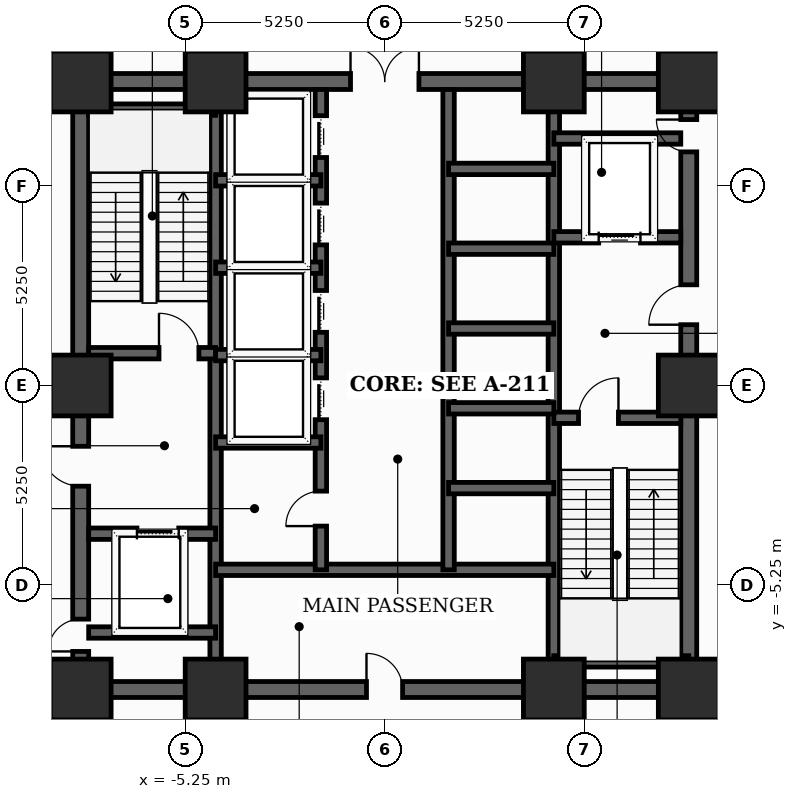
"""IFC4 building model, lengths in metres.
Left out: names, types, materials, properties, quantities, classifications, styles, units other than length and angle.
Written with IfcOpenShell. Run it as: python <this file> out.ifc"""

import sys

from ifc_helpers import new_model, si_unit, direction, frame, frame_2d, origin, origin_2d, place, context, subcontext, project, spatial, rectangle, extrude, element, fill, save


model = new_model("IFC4")
c1 = context("Model", 3, precision=1e-05, world=origin(), true_north=direction((0.0, 1.0)))
c2 = subcontext(c1, "Body", "Model", "MODEL_VIEW")
j1 = project(units=[si_unit("LENGTHUNIT", "METRE"), si_unit("PLANEANGLEUNIT", "RADIAN")], contexts=[c1])
p1 = place(None, origin())
s1 = spatial("IfcSite", under=j1, at=p1, CompositionType="ELEMENT")
p2 = place(p1, origin())
s2 = spatial("IfcBuilding", under=s1, at=p2, CompositionType="ELEMENT")
p3 = place(p2, frame((0.0, 0.0, -9.6)))
s3 = spatial("IfcBuildingStorey", under=s2, at=p3, CompositionType="ELEMENT", Elevation=-9.6)
for number, where, z_axis, x_axis in (
    (1, (-8.0, -8.0, 0.0), (0.0, 0.0, 1.0), (1.0, 0.0, 0.0)),
    (2, (-4.45, -8.0, 0.0), (0.0, 0.0, 1.0), (1.0, 0.0, 0.0)),
    (3, (4.45, -8.0, 0.0), (0.0, 0.0, 1.0), (1.0, 0.0, 0.0)),
    (4, (8.0, -8.0, 0.0), (0.0, 0.0, 1.0), (1.0, 0.0, 0.0)),
    (5, (8.0, 0.0, 0.0), (0.0, 0.0, 1.0), (1.0, 0.0, 0.0)),
    (6, (8.0, 8.0, 0.0), (0.0, 0.0, 1.0), (1.0, 0.0, 0.0)),
    (7, (4.45, 8.0, 0.0), (0.0, 0.0, 1.0), (1.0, 0.0, 0.0)),
    (8, (-4.45, 8.0, 0.0), (0.0, 0.0, 1.0), (1.0, 0.0, 0.0)),
    (9, (-8.0, 8.0, 0.0), (0.0, 0.0, 1.0), (1.0, 0.0, 0.0)),
    (10, (-8.0, 0.0, 0.0), (0.0, 0.0, 1.0), (1.0, 0.0, 0.0)),
):
    element("IfcColumn", number, at=place(p3, frame(where, z_axis=z_axis, x_axis=x_axis)), inside=s3, PredefinedType="COLUMN", context=c2, shape_type="SweptSolid", body=[
        extrude(rectangle(XDim=1.6, YDim=1.6, at=origin_2d()), origin(), (0.0, 0.0, 1.0), 4.8),
    ])
p4 = place(p3, frame((-8.0, -8.0, 0.0), z_axis=(0.0, 0.0, 1.0), x_axis=(0.0, 1.0, 0.0)))
e11 = element("IfcWall", 11, at=p4, inside=s3, PredefinedType="SHEAR", context=c2, shape_type="SweptSolid", body=[
    extrude(rectangle(XDim=16.0, YDim=0.42, at=frame_2d((8.0, 0.0))), origin(), (0.0, 0.0, 1.0), 4.52),
])
p5 = place(p4, frame((1.002, 0.0, 0.0)))
e12 = element("IfcOpeningElement", 12, at=p5, cuts=e11, PredefinedType="OPENING", context=c2, shape_type="SweptSolid", body=[
    extrude(rectangle(XDim=0.85, YDim=2.02, at=frame_2d((0.425, 1.01))), frame((0.0, 0.22, 0.0), z_axis=(0.0, -1.0, 0.0), x_axis=(1.0, 0.0, 0.0)), (0.0, 0.0, 1.0), 0.44),
])
p6 = place(p4, frame((5.35, 0.0, 0.0)))
e13 = element("IfcOpeningElement", 13, at=p6, cuts=e11, PredefinedType="OPENING", context=c2, shape_type="SweptSolid", body=[
    extrude(rectangle(XDim=1.05, YDim=2.15, at=frame_2d((0.525, 1.075))), frame((0.0, 0.22, 0.0), z_axis=(0.0, -1.0, 0.0), x_axis=(1.0, 0.0, 0.0)), (0.0, 0.0, 1.0), 0.44),
])
p7 = place(p3, frame((8.0, -8.0, 0.0), z_axis=(0.0, 0.0, 1.0), x_axis=(0.0, 1.0, 0.0)))
e14 = element("IfcWall", 14, at=p7, inside=s3, PredefinedType="SHEAR", context=c2, shape_type="SweptSolid", body=[
    extrude(rectangle(XDim=16.0, YDim=0.42, at=frame_2d((8.0, 0.0))), origin(), (0.0, 0.0, 1.0), 4.52),
])
p8 = place(p7, frame((9.6, 0.0, 0.0)))
e15 = element("IfcOpeningElement", 15, at=p8, cuts=e14, PredefinedType="OPENING", context=c2, shape_type="SweptSolid", body=[
    extrude(rectangle(XDim=1.05, YDim=2.15, at=frame_2d((0.525, 1.075))), frame((0.0, 0.22, 0.0), z_axis=(0.0, -1.0, 0.0), x_axis=(1.0, 0.0, 0.0)), (0.0, 0.0, 1.0), 0.44),
])
p9 = place(p7, frame((14.148, 0.0, 0.0)))
e16 = element("IfcOpeningElement", 16, at=p9, cuts=e14, PredefinedType="OPENING", context=c2, shape_type="SweptSolid", body=[
    extrude(rectangle(XDim=0.85, YDim=2.02, at=frame_2d((0.425, 1.01))), frame((0.0, 0.22, 0.0), z_axis=(0.0, -1.0, 0.0), x_axis=(1.0, 0.0, 0.0)), (0.0, 0.0, 1.0), 0.44),
])
p10 = place(p3, frame((-8.0, -8.0, 0.0), z_axis=(0.0, 0.0, 1.0), x_axis=(1.0, 0.0, 0.0)))
e17 = element("IfcWall", 17, at=p10, inside=s3, PredefinedType="SHEAR", context=c2, shape_type="SweptSolid", body=[
    extrude(rectangle(XDim=16.0, YDim=0.42, at=frame_2d((8.0, 0.0))), origin(), (0.0, 0.0, 1.0), 4.52),
])
p11 = place(p10, frame((7.52, 0.0, 0.0)))
e18 = element("IfcOpeningElement", 18, at=p11, cuts=e17, PredefinedType="OPENING", context=c2, shape_type="SweptSolid", body=[
    extrude(rectangle(XDim=0.95, YDim=2.1, at=frame_2d((0.475, 1.05))), frame((0.0, 0.22, 0.0), z_axis=(0.0, -1.0, 0.0), x_axis=(1.0, 0.0, 0.0)), (0.0, 0.0, 1.0), 0.44),
])
p12 = place(p3, frame((-8.0, 8.0, 0.0), z_axis=(0.0, 0.0, 1.0), x_axis=(1.0, 0.0, 0.0)))
e19 = element("IfcWall", 19, at=p12, inside=s3, PredefinedType="SHEAR", context=c2, shape_type="SweptSolid", body=[
    extrude(rectangle(XDim=16.0, YDim=0.42, at=frame_2d((8.0, 0.0))), origin(), (0.0, 0.0, 1.0), 4.52),
])
p13 = place(p12, frame((7.1, 0.0, 0.0)))
e20 = element("IfcOpeningElement", 20, at=p13, cuts=e19, PredefinedType="OPENING", context=c2, shape_type="SweptSolid", body=[
    extrude(rectangle(XDim=1.8, YDim=2.15, at=frame_2d((0.9, 1.075))), frame((0.0, 0.22, 0.0), z_axis=(0.0, -1.0, 0.0), x_axis=(1.0, 0.0, 0.0)), (0.0, 0.0, 1.0), 0.44),
])
for number, where, z_axis, x_axis in (
    (21, (-4.45, -7.79, 0.0), (0.0, 0.0, 1.0), (0.0, 1.0, 0.0)),
    (22, (4.45, -7.79, 0.0), (0.0, 0.0, 1.0), (0.0, 1.0, 0.0)),
):
    element("IfcWall", number, at=place(p3, frame(where, z_axis=z_axis, x_axis=x_axis)), inside=s3, PredefinedType="SHEAR", context=c2, shape_type="SweptSolid", body=[
        extrude(rectangle(XDim=15.58, YDim=0.3, at=frame_2d((7.79, 0.0))), origin(), (0.0, 0.0, 1.0), 4.52),
    ])
p14 = place(p3, frame((-7.79, 0.85, 0.0), z_axis=(0.0, 0.0, 1.0), x_axis=(1.0, 0.0, 0.0)))
e23 = element("IfcWall", 23, at=p14, inside=s3, PredefinedType="SHEAR", context=c2, shape_type="SweptSolid", body=[
    extrude(rectangle(XDim=3.34, YDim=0.3, at=frame_2d((1.67, 0.0))), origin(), (0.0, 0.0, 1.0), 4.52),
])
p15 = place(p14, frame((1.85, 0.0, 0.0)))
e24 = element("IfcOpeningElement", 24, at=p15, cuts=e23, PredefinedType="OPENING", context=c2, shape_type="SweptSolid", body=[
    extrude(rectangle(XDim=1.05, YDim=2.15, at=frame_2d((0.525, 1.075))), frame((0.0, 0.16, 0.0), z_axis=(0.0, -1.0, 0.0), x_axis=(1.0, 0.0, 0.0)), (0.0, 0.0, 1.0), 0.32),
])
p16 = place(p3, frame((-7.79, 7.26, 0.0), z_axis=(0.0, 0.0, 1.0), x_axis=(1.0, 0.0, 0.0)))
e25 = element("IfcWall", 25, at=p16, inside=s3, PredefinedType="SHEAR", context=c2, shape_type="SweptSolid", body=[
    extrude(rectangle(XDim=3.34, YDim=0.3, at=frame_2d((1.67, 0.0))), origin(), (0.0, 0.0, 1.0), 4.52),
])
p17 = place(p3, frame((4.45, -0.85, 0.0), z_axis=(0.0, 0.0, 1.0), x_axis=(1.0, 0.0, 0.0)))
e26 = element("IfcWall", 26, at=p17, inside=s3, PredefinedType="SHEAR", context=c2, shape_type="SweptSolid", body=[
    extrude(rectangle(XDim=3.34, YDim=0.3, at=frame_2d((1.67, 0.0))), origin(), (0.0, 0.0, 1.0), 4.52),
])
p18 = place(p17, frame((0.65, 0.0, 0.0)))
e27 = element("IfcOpeningElement", 27, at=p18, cuts=e26, PredefinedType="OPENING", context=c2, shape_type="SweptSolid", body=[
    extrude(rectangle(XDim=1.05, YDim=2.15, at=frame_2d((0.525, 1.075))), frame((0.0, 0.16, 0.0), z_axis=(0.0, -1.0, 0.0), x_axis=(1.0, 0.0, 0.0)), (0.0, 0.0, 1.0), 0.32),
])
p19 = place(p3, frame((4.45, -7.26, 0.0), z_axis=(0.0, 0.0, 1.0), x_axis=(1.0, 0.0, 0.0)))
e28 = element("IfcWall", 28, at=p19, inside=s3, PredefinedType="SHEAR", context=c2, shape_type="SweptSolid", body=[
    extrude(rectangle(XDim=3.55, YDim=0.3, at=frame_2d((1.775, 0.0))), origin(), (0.0, 0.0, 1.0), 4.52),
])
p20 = place(p3, frame((-7.79, -3.9, 0.0), z_axis=(0.0, 0.0, 1.0), x_axis=(1.0, 0.0, 0.0)))
e29 = element("IfcWall", 29, at=p20, inside=s3, PredefinedType="SHEAR", context=c2, shape_type="SweptSolid", body=[
    extrude(rectangle(XDim=3.34, YDim=0.3, at=frame_2d((1.67, 0.0))), origin(), (0.0, 0.0, 1.0), 4.52),
])
p21 = place(p20, frame((1.27, 0.0, 0.0)))
e30 = element("IfcOpeningElement", 30, at=p21, cuts=e29, PredefinedType="OPENING", context=c2, shape_type="SweptSolid", body=[
    extrude(rectangle(XDim=1.1, YDim=2.1, at=frame_2d((0.55, 1.05))), frame((0.0, 0.16, 0.0), z_axis=(0.0, -1.0, 0.0), x_axis=(1.0, 0.0, 0.0)), (0.0, 0.0, 1.0), 0.32),
])
p22 = place(p3, frame((-7.79, -6.5, 0.0), z_axis=(0.0, 0.0, 1.0), x_axis=(1.0, 0.0, 0.0)))
e31 = element("IfcWall", 31, at=p22, inside=s3, PredefinedType="SHEAR", context=c2, shape_type="SweptSolid", body=[
    extrude(rectangle(XDim=3.34, YDim=0.3, at=frame_2d((1.67, 0.0))), origin(), (0.0, 0.0, 1.0), 4.52),
])
p23 = place(p3, frame((4.45, 3.9, 0.0), z_axis=(0.0, 0.0, 1.0), x_axis=(1.0, 0.0, 0.0)))
e32 = element("IfcWall", 32, at=p23, inside=s3, PredefinedType="SHEAR", context=c2, shape_type="SweptSolid", body=[
    extrude(rectangle(XDim=3.34, YDim=0.3, at=frame_2d((1.67, 0.0))), origin(), (0.0, 0.0, 1.0), 4.52),
])
p24 = place(p23, frame((1.18, 0.0, 0.0)))
e33 = element("IfcOpeningElement", 33, at=p24, cuts=e32, PredefinedType="OPENING", context=c2, shape_type="SweptSolid", body=[
    extrude(rectangle(XDim=1.1, YDim=2.1, at=frame_2d((0.55, 1.05))), frame((0.0, 0.16, 0.0), z_axis=(0.0, -1.0, 0.0), x_axis=(1.0, 0.0, 0.0)), (0.0, 0.0, 1.0), 0.32),
])
p25 = place(p3, frame((4.45, 6.5, 0.0), z_axis=(0.0, 0.0, 1.0), x_axis=(1.0, 0.0, 0.0)))
e34 = element("IfcWall", 34, at=p25, inside=s3, PredefinedType="SHEAR", context=c2, shape_type="SweptSolid", body=[
    extrude(rectangle(XDim=3.34, YDim=0.3, at=frame_2d((1.67, 0.0))), origin(), (0.0, 0.0, 1.0), 4.52),
])
p26 = place(p3, frame((-4.45, -4.85, 0.0), z_axis=(0.0, 0.0, 1.0), x_axis=(1.0, 0.0, 0.0)))
e35 = element("IfcWall", 35, at=p26, inside=s3, PredefinedType="SHEAR", context=c2, shape_type="SweptSolid", body=[
    extrude(rectangle(XDim=8.9, YDim=0.3, at=frame_2d((4.45, 0.0))), origin(), (0.0, 0.0, 1.0), 4.52),
])
p27 = place(p3, frame((-1.68, -4.85, 0.0), z_axis=(0.0, 0.0, 1.0), x_axis=(0.0, 1.0, 0.0)))
e36 = element("IfcWall", 36, at=p27, inside=s3, PredefinedType="SHEAR", context=c2, shape_type="SweptSolid", body=[
    extrude(rectangle(XDim=12.64, YDim=0.3, at=frame_2d((6.32, 0.0))), origin(), (0.0, 0.0, 1.0), 4.52),
])
p28 = place(p27, frame((3.95, 0.0, 0.0)))
e37 = element("IfcOpeningElement", 37, at=p28, cuts=e36, PredefinedType="OPENING", context=c2, shape_type="SweptSolid", body=[
    extrude(rectangle(XDim=1.1, YDim=2.1, at=frame_2d((0.55, 1.05))), frame((0.0, 0.16, 0.0), z_axis=(0.0, -1.0, 0.0), x_axis=(1.0, 0.0, 0.0)), (0.0, 0.0, 1.0), 0.32),
])
p29 = place(p27, frame((6.25, 0.0, 0.0)))
e38 = element("IfcOpeningElement", 38, at=p29, cuts=e36, PredefinedType="OPENING", context=c2, shape_type="SweptSolid", body=[
    extrude(rectangle(XDim=1.1, YDim=2.1, at=frame_2d((0.55, 1.05))), frame((0.0, 0.16, 0.0), z_axis=(0.0, -1.0, 0.0), x_axis=(1.0, 0.0, 0.0)), (0.0, 0.0, 1.0), 0.32),
])
p30 = place(p27, frame((8.55, 0.0, 0.0)))
e39 = element("IfcOpeningElement", 39, at=p30, cuts=e36, PredefinedType="OPENING", context=c2, shape_type="SweptSolid", body=[
    extrude(rectangle(XDim=1.1, YDim=2.1, at=frame_2d((0.55, 1.05))), frame((0.0, 0.16, 0.0), z_axis=(0.0, -1.0, 0.0), x_axis=(1.0, 0.0, 0.0)), (0.0, 0.0, 1.0), 0.32),
])
p31 = place(p27, frame((10.85, 0.0, 0.0)))
e40 = element("IfcOpeningElement", 40, at=p31, cuts=e36, PredefinedType="OPENING", context=c2, shape_type="SweptSolid", body=[
    extrude(rectangle(XDim=1.1, YDim=2.1, at=frame_2d((0.55, 1.05))), frame((0.0, 0.16, 0.0), z_axis=(0.0, -1.0, 0.0), x_axis=(1.0, 0.0, 0.0)), (0.0, 0.0, 1.0), 0.32),
])
p32 = place(p27, frame((1.15, 0.0, 0.0)))
e41 = element("IfcOpeningElement", 41, at=p32, cuts=e36, PredefinedType="OPENING", context=c2, shape_type="SweptSolid", body=[
    extrude(rectangle(XDim=0.92, YDim=2.1, at=frame_2d((0.46, 1.05))), frame((0.0, 0.16, 0.0), z_axis=(0.0, -1.0, 0.0), x_axis=(1.0, 0.0, 0.0)), (0.0, 0.0, 1.0), 0.32),
])
p33 = place(p3, frame((1.68, -4.85, 0.0), z_axis=(0.0, 0.0, 1.0), x_axis=(0.0, 1.0, 0.0)))
e42 = element("IfcWall", 42, at=p33, inside=s3, PredefinedType="SHEAR", context=c2, shape_type="SweptSolid", body=[
    extrude(rectangle(XDim=12.64, YDim=0.3, at=frame_2d((6.32, 0.0))), origin(), (0.0, 0.0, 1.0), 4.52),
])
for number, where, z_axis, x_axis in (
    (43, (-4.45, -1.5, 0.0), (0.0, 0.0, 1.0), (1.0, 0.0, 0.0)),
    (44, (-4.45, 0.8, 0.0), (0.0, 0.0, 1.0), (1.0, 0.0, 0.0)),
    (45, (-4.45, 3.1, 0.0), (0.0, 0.0, 1.0), (1.0, 0.0, 0.0)),
    (46, (-4.45, 5.4, 0.0), (0.0, 0.0, 1.0), (1.0, 0.0, 0.0)),
    (47, (1.68, 1.5, 0.0), (0.0, 0.0, 1.0), (1.0, 0.0, 0.0)),
    (48, (1.68, 3.6, 0.0), (0.0, 0.0, 1.0), (1.0, 0.0, 0.0)),
    (49, (1.68, 5.7, 0.0), (0.0, 0.0, 1.0), (1.0, 0.0, 0.0)),
    (50, (1.68, -2.7, 0.0), (0.0, 0.0, 1.0), (1.0, 0.0, 0.0)),
    (51, (1.68, -0.6, 0.0), (0.0, 0.0, 1.0), (1.0, 0.0, 0.0)),
):
    element("IfcWall", number, at=place(p3, frame(where, z_axis=z_axis, x_axis=x_axis)), inside=s3, PredefinedType="SHEAR", context=c2, shape_type="SweptSolid", body=[
        extrude(rectangle(XDim=2.77, YDim=0.3, at=frame_2d((1.385, 0.0))), origin(), (0.0, 0.0, 1.0), 4.52),
    ])
p34 = place(p5, origin())
e52 = element("IfcDoor", 52, at=p34, inside=s3, OperationType="SINGLE_SWING_LEFT", PredefinedType="TRAPDOOR", context=c2, shape_type="SweptSolid", body=[
    extrude(rectangle(XDim=0.85, YDim=2.02, at=frame_2d((0.425, 1.01))), frame((0.0, 0.025, 0.0), z_axis=(0.0, -1.0, 0.0), x_axis=(1.0, 0.0, 0.0)), (0.0, 0.0, 1.0), 0.05),
])
fill(e12, e52)
p35 = place(p6, origin())
e53 = element("IfcDoor", 53, at=p35, inside=s3, OperationType="SINGLE_SWING_RIGHT", PredefinedType="DOOR", context=c2, shape_type="SweptSolid", body=[
    extrude(rectangle(XDim=1.05, YDim=2.15, at=frame_2d((0.525, 1.075))), frame((0.0, 0.025, 0.0), z_axis=(0.0, -1.0, 0.0), x_axis=(1.0, 0.0, 0.0)), (0.0, 0.0, 1.0), 0.05),
])
fill(e13, e53)
p36 = place(p8, origin())
e54 = element("IfcDoor", 54, at=p36, inside=s3, OperationType="SINGLE_SWING_LEFT", PredefinedType="DOOR", context=c2, shape_type="SweptSolid", body=[
    extrude(rectangle(XDim=1.05, YDim=2.15, at=frame_2d((0.525, 1.075))), frame((0.0, 0.025, 0.0), z_axis=(0.0, -1.0, 0.0), x_axis=(1.0, 0.0, 0.0)), (0.0, 0.0, 1.0), 0.05),
])
fill(e15, e54)
p37 = place(p9, origin())
e55 = element("IfcDoor", 55, at=p37, inside=s3, OperationType="SINGLE_SWING_RIGHT", PredefinedType="TRAPDOOR", context=c2, shape_type="SweptSolid", body=[
    extrude(rectangle(XDim=0.85, YDim=2.02, at=frame_2d((0.425, 1.01))), frame((0.0, 0.025, 0.0), z_axis=(0.0, -1.0, 0.0), x_axis=(1.0, 0.0, 0.0)), (0.0, 0.0, 1.0), 0.05),
])
fill(e16, e55)
p38 = place(p11, origin())
e56 = element("IfcDoor", 56, at=p38, inside=s3, OperationType="SINGLE_SWING_LEFT", PredefinedType="DOOR", context=c2, shape_type="SweptSolid", body=[
    extrude(rectangle(XDim=0.95, YDim=2.1, at=frame_2d((0.475, 1.05))), frame((0.0, 0.025, 0.0), z_axis=(0.0, -1.0, 0.0), x_axis=(1.0, 0.0, 0.0)), (0.0, 0.0, 1.0), 0.05),
])
fill(e18, e56)
p39 = place(p13, origin())
e57 = element("IfcDoor", 57, at=p39, inside=s3, OperationType="DOUBLE_DOOR_SINGLE_SWING", PredefinedType="DOOR", context=c2, shape_type="SweptSolid", body=[
    extrude(rectangle(XDim=1.8, YDim=2.15, at=frame_2d((0.9, 1.075))), frame((0.0, 0.025, 0.0), z_axis=(0.0, -1.0, 0.0), x_axis=(1.0, 0.0, 0.0)), (0.0, 0.0, 1.0), 0.05),
])
fill(e20, e57)
p40 = place(p15, origin())
e58 = element("IfcDoor", 58, at=p40, inside=s3, OperationType="SINGLE_SWING_LEFT", PredefinedType="DOOR", context=c2, shape_type="SweptSolid", body=[
    extrude(rectangle(XDim=1.05, YDim=2.15, at=frame_2d((0.525, 1.075))), frame((0.0, 0.025, 0.0), z_axis=(0.0, -1.0, 0.0), x_axis=(1.0, 0.0, 0.0)), (0.0, 0.0, 1.0), 0.05),
])
fill(e24, e58)
p41 = place(p18, origin())
e59 = element("IfcDoor", 59, at=p41, inside=s3, OperationType="SINGLE_SWING_RIGHT", PredefinedType="DOOR", context=c2, shape_type="SweptSolid", body=[
    extrude(rectangle(XDim=1.05, YDim=2.15, at=frame_2d((0.525, 1.075))), frame((0.0, 0.025, 0.0), z_axis=(0.0, -1.0, 0.0), x_axis=(1.0, 0.0, 0.0)), (0.0, 0.0, 1.0), 0.05),
])
fill(e27, e59)
p42 = place(p21, origin())
e60 = element("IfcDoor", 60, at=p42, inside=s3, OperationType="SLIDING_TO_LEFT", PredefinedType="DOOR", context=c2, shape_type="SweptSolid", body=[
    extrude(rectangle(XDim=1.1, YDim=2.1, at=frame_2d((0.55, 1.05))), frame((0.0, 0.025, 0.0), z_axis=(0.0, -1.0, 0.0), x_axis=(1.0, 0.0, 0.0)), (0.0, 0.0, 1.0), 0.05),
])
fill(e30, e60)
p43 = place(p24, origin())
e61 = element("IfcDoor", 61, at=p43, inside=s3, OperationType="SLIDING_TO_LEFT", PredefinedType="DOOR", context=c2, shape_type="SweptSolid", body=[
    extrude(rectangle(XDim=1.1, YDim=2.1, at=frame_2d((0.55, 1.05))), frame((0.0, 0.025, 0.0), z_axis=(0.0, -1.0, 0.0), x_axis=(1.0, 0.0, 0.0)), (0.0, 0.0, 1.0), 0.05),
])
fill(e33, e61)
p44 = place(p28, origin())
e62 = element("IfcDoor", 62, at=p44, inside=s3, OperationType="SLIDING_TO_LEFT", PredefinedType="DOOR", context=c2, shape_type="SweptSolid", body=[
    extrude(rectangle(XDim=1.1, YDim=2.1, at=frame_2d((0.55, 1.05))), frame((0.0, 0.025, 0.0), z_axis=(0.0, -1.0, 0.0), x_axis=(1.0, 0.0, 0.0)), (0.0, 0.0, 1.0), 0.05),
])
fill(e37, e62)
p45 = place(p29, origin())
e63 = element("IfcDoor", 63, at=p45, inside=s3, OperationType="SLIDING_TO_LEFT", PredefinedType="DOOR", context=c2, shape_type="SweptSolid", body=[
    extrude(rectangle(XDim=1.1, YDim=2.1, at=frame_2d((0.55, 1.05))), frame((0.0, 0.025, 0.0), z_axis=(0.0, -1.0, 0.0), x_axis=(1.0, 0.0, 0.0)), (0.0, 0.0, 1.0), 0.05),
])
fill(e38, e63)
p46 = place(p30, origin())
e64 = element("IfcDoor", 64, at=p46, inside=s3, OperationType="SLIDING_TO_LEFT", PredefinedType="DOOR", context=c2, shape_type="SweptSolid", body=[
    extrude(rectangle(XDim=1.1, YDim=2.1, at=frame_2d((0.55, 1.05))), frame((0.0, 0.025, 0.0), z_axis=(0.0, -1.0, 0.0), x_axis=(1.0, 0.0, 0.0)), (0.0, 0.0, 1.0), 0.05),
])
fill(e39, e64)
p47 = place(p31, origin())
e65 = element("IfcDoor", 65, at=p47, inside=s3, OperationType="SLIDING_TO_LEFT", PredefinedType="DOOR", context=c2, shape_type="SweptSolid", body=[
    extrude(rectangle(XDim=1.1, YDim=2.1, at=frame_2d((0.55, 1.05))), frame((0.0, 0.025, 0.0), z_axis=(0.0, -1.0, 0.0), x_axis=(1.0, 0.0, 0.0)), (0.0, 0.0, 1.0), 0.05),
])
fill(e40, e65)
p48 = place(p32, origin())
e66 = element("IfcDoor", 66, at=p48, inside=s3, OperationType="SINGLE_SWING_LEFT", PredefinedType="DOOR", context=c2, shape_type="SweptSolid", body=[
    extrude(rectangle(XDim=0.92, YDim=2.1, at=frame_2d((0.46, 1.05))), frame((0.0, 0.025, 0.0), z_axis=(0.0, -1.0, 0.0), x_axis=(1.0, 0.0, 0.0)), (0.0, 0.0, 1.0), 0.05),
])
fill(e41, e66)
save(model, sys.argv[1])
